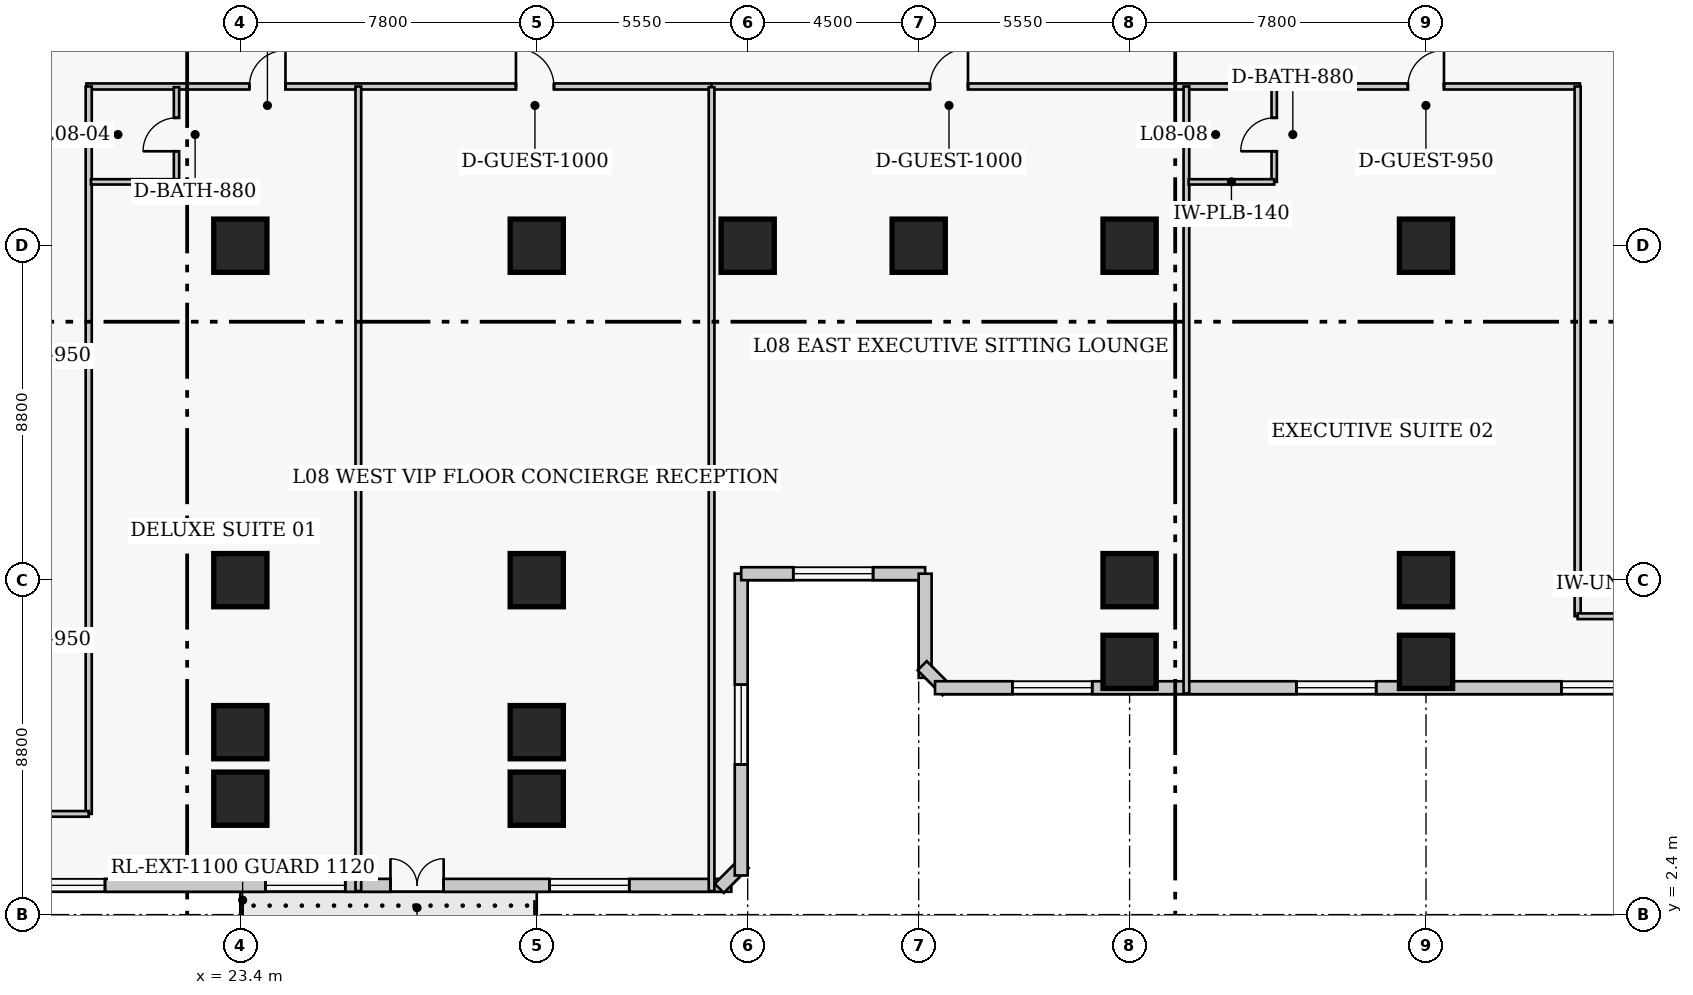
"""IFC4 building model, lengths in metres.
Left out: names, types, materials, properties, quantities, classifications, styles, units other than length and angle.
Written with IfcOpenShell. Run it as: python <this file> out.ifc"""

import sys

from ifc_helpers import new_model, si_unit, direction, frame, frame_2d, origin, origin_2d, place, context, subcontext, project, spatial, rectangle, extrude, element, fill, save


model = new_model("IFC4")
c1 = context("Model", 3, precision=1e-05, world=origin(), true_north=direction((0.0, 1.0)))
c2 = subcontext(c1, "Body", "Model", "MODEL_VIEW")
j1 = project(units=[si_unit("LENGTHUNIT", "METRE"), si_unit("PLANEANGLEUNIT", "RADIAN")], contexts=[c1])
p1 = place(None, origin())
s1 = spatial("IfcSite", under=j1, at=p1, CompositionType="ELEMENT")
p2 = place(p1, origin())
s2 = spatial("IfcBuilding", under=s1, at=p2, CompositionType="ELEMENT")
p3 = place(p2, frame((0.0, 0.0, 37.4)))
s3 = spatial("IfcBuildingStorey", under=s2, at=p3, CompositionType="ELEMENT", Elevation=37.4)
for number, where, z_axis, x_axis in (
    (1, (23.4, 11.2, 0.0), (0.0, 0.0, 1.0), (1.0, 0.0, 0.0)),
    (2, (23.4, 20.0, 0.0), (0.0, 0.0, 1.0), (1.0, 0.0, 0.0)),
    (3, (31.2, 11.2, 0.0), (0.0, 0.0, 1.0), (1.0, 0.0, 0.0)),
    (4, (31.2, 20.0, 0.0), (0.0, 0.0, 1.0), (1.0, 0.0, 0.0)),
    (5, (36.75, 20.0, 0.0), (0.0, 0.0, 1.0), (1.0, 0.0, 0.0)),
    (6, (41.25, 20.0, 0.0), (0.0, 0.0, 1.0), (1.0, 0.0, 0.0)),
    (7, (46.8, 11.2, 0.0), (0.0, 0.0, 1.0), (1.0, 0.0, 0.0)),
    (8, (46.8, 20.0, 0.0), (0.0, 0.0, 1.0), (1.0, 0.0, 0.0)),
    (9, (54.6, 11.2, 0.0), (0.0, 0.0, 1.0), (1.0, 0.0, 0.0)),
    (10, (54.6, 20.0, 0.0), (0.0, 0.0, 1.0), (1.0, 0.0, 0.0)),
    (11, (23.4, 7.2, 0.0), (0.0, 0.0, 1.0), (1.0, 0.0, 0.0)),
    (12, (31.2, 7.2, 0.0), (0.0, 0.0, 1.0), (1.0, 0.0, 0.0)),
    (13, (23.4, 5.45, 0.0), (0.0, 0.0, 1.0), (1.0, 0.0, 0.0)),
    (14, (31.2, 5.45, 0.0), (0.0, 0.0, 1.0), (1.0, 0.0, 0.0)),
    (15, (46.8, 9.05, 0.0), (0.0, 0.0, 1.0), (1.0, 0.0, 0.0)),
    (16, (54.6, 9.05, 0.0), (0.0, 0.0, 1.0), (1.0, 0.0, 0.0)),
):
    element("IfcColumn", number, at=place(p3, frame(where, z_axis=z_axis, x_axis=x_axis)), inside=s3, PredefinedType="COLUMN", context=c2, shape_type="SweptSolid", body=[
        extrude(rectangle(XDim=1.4, YDim=1.4, at=origin_2d()), origin(), (0.0, 0.0, 1.0), 3.8),
    ])
p4 = place(p3, frame((6.43, 3.17, 0.0), z_axis=(0.0, 0.0, 1.0), x_axis=(1.0, 0.0, 0.0)))
e17 = element("IfcWall", 17, at=p4, inside=s3, PredefinedType="SOLIDWALL", context=c2, shape_type="SweptSolid", body=[
    extrude(rectangle(XDim=29.89, YDim=0.34, at=frame_2d((14.945, 0.0))), origin(), (0.0, 0.0, 1.0), 3.54),
])
p5 = place(p4, frame((20.92, 0.0, 0.0)))
e18 = element("IfcOpeningElement", 18, at=p5, cuts=e17, PredefinedType="OPENING", context=c2, shape_type="SweptSolid", body=[
    extrude(rectangle(XDim=1.4, YDim=2.15, at=frame_2d((0.7, 1.075))), frame((0.0, 0.18, 0.0), z_axis=(0.0, -1.0, 0.0), x_axis=(1.0, 0.0, 0.0)), (0.0, 0.0, 1.0), 0.36),
])
p6 = place(p4, frame((2.686, 0.0, 0.85)))
e19 = element("IfcOpeningElement", 19, at=p6, cuts=e17, PredefinedType="OPENING", context=c2, shape_type="SweptSolid", body=[
    extrude(rectangle(XDim=2.1, YDim=1.85, at=frame_2d((1.05, 0.925))), frame((0.0, 0.18, 0.0), z_axis=(0.0, -1.0, 0.0), x_axis=(1.0, 0.0, 0.0)), (0.0, 0.0, 1.0), 0.36),
])
p7 = place(p4, frame((11.309, 0.0, 0.85)))
e20 = element("IfcOpeningElement", 20, at=p7, cuts=e17, PredefinedType="OPENING", context=c2, shape_type="SweptSolid", body=[
    extrude(rectangle(XDim=2.1, YDim=1.85, at=frame_2d((1.05, 0.925))), frame((0.0, 0.18, 0.0), z_axis=(0.0, -1.0, 0.0), x_axis=(1.0, 0.0, 0.0)), (0.0, 0.0, 1.0), 0.36),
])
p8 = place(p4, frame((17.631, 0.0, 0.85)))
e21 = element("IfcOpeningElement", 21, at=p8, cuts=e17, PredefinedType="OPENING", context=c2, shape_type="SweptSolid", body=[
    extrude(rectangle(XDim=2.1, YDim=1.85, at=frame_2d((1.05, 0.925))), frame((0.0, 0.18, 0.0), z_axis=(0.0, -1.0, 0.0), x_axis=(1.0, 0.0, 0.0)), (0.0, 0.0, 1.0), 0.36),
])
p9 = place(p4, frame((25.104, 0.0, 0.85)))
e22 = element("IfcOpeningElement", 22, at=p9, cuts=e17, PredefinedType="OPENING", context=c2, shape_type="SweptSolid", body=[
    extrude(rectangle(XDim=2.1, YDim=1.85, at=frame_2d((1.05, 0.925))), frame((0.0, 0.18, 0.0), z_axis=(0.0, -1.0, 0.0), x_axis=(1.0, 0.0, 0.0)), (0.0, 0.0, 1.0), 0.36),
])
p10 = place(p3, frame((36.001, 3.092, 0.0), z_axis=(0.0, 0.0, 1.0), x_axis=(0.707106781187, 0.707106781187, 0.0)))
e23 = element("IfcWall", 23, at=p10, inside=s3, PredefinedType="SOLIDWALL", context=c2, shape_type="SweptSolid", body=[
    extrude(rectangle(XDim=0.929, YDim=0.34, at=frame_2d((0.464, 0.0))), origin(), (0.0, 0.0, 1.0), 3.54),
])
p11 = place(p3, frame((36.58, 3.43, 0.0), z_axis=(0.0, 0.0, 1.0), x_axis=(0.0, 1.0, 0.0)))
e24 = element("IfcWall", 24, at=p11, inside=s3, PredefinedType="SOLIDWALL", context=c2, shape_type="SweptSolid", body=[
    extrude(rectangle(XDim=7.94, YDim=0.34, at=frame_2d((3.97, 0.0))), origin(), (0.0, 0.0, 1.0), 3.54),
])
p12 = place(p11, frame((2.92, 0.0, 0.85)))
e25 = element("IfcOpeningElement", 25, at=p12, cuts=e24, PredefinedType="OPENING", context=c2, shape_type="SweptSolid", body=[
    extrude(rectangle(XDim=2.1, YDim=1.85, at=frame_2d((1.05, 0.925))), frame((0.0, 0.18, 0.0), z_axis=(0.0, -1.0, 0.0), x_axis=(1.0, 0.0, 0.0)), (0.0, 0.0, 1.0), 0.36),
])
p13 = place(p3, frame((36.58, 11.37, 0.0), z_axis=(0.0, 0.0, 1.0), x_axis=(1.0, 0.0, 0.0)))
e26 = element("IfcWall", 26, at=p13, inside=s3, PredefinedType="SOLIDWALL", context=c2, shape_type="SweptSolid", body=[
    extrude(rectangle(XDim=4.84, YDim=0.34, at=frame_2d((2.42, 0.0))), origin(), (0.0, 0.0, 1.0), 3.54),
])
p14 = place(p13, frame((1.37, 0.0, 0.85)))
e27 = element("IfcOpeningElement", 27, at=p14, cuts=e26, PredefinedType="OPENING", context=c2, shape_type="SweptSolid", body=[
    extrude(rectangle(XDim=2.1, YDim=1.85, at=frame_2d((1.05, 0.925))), frame((0.0, 0.18, 0.0), z_axis=(0.0, -1.0, 0.0), x_axis=(1.0, 0.0, 0.0)), (0.0, 0.0, 1.0), 0.36),
])
p15 = place(p3, frame((41.42, 11.37, 0.0), z_axis=(0.0, 0.0, 1.0), x_axis=(0.0, -1.0, 0.0)))
e28 = element("IfcWall", 28, at=p15, inside=s3, PredefinedType="SOLIDWALL", context=c2, shape_type="SweptSolid", body=[
    extrude(rectangle(XDim=2.74, YDim=0.34, at=frame_2d((1.37, 0.0))), origin(), (0.0, 0.0, 1.0), 3.54),
])
p16 = place(p3, frame((41.342, 8.948, 0.0), z_axis=(0.0, 0.0, 1.0), x_axis=(0.707238225886, -0.706975312048, 0.0)))
e29 = element("IfcWall", 29, at=p16, inside=s3, PredefinedType="SOLIDWALL", context=c2, shape_type="SweptSolid", body=[
    extrude(rectangle(XDim=0.929, YDim=0.34, at=frame_2d((0.464, 0.0))), origin(), (0.0, 0.0, 1.0), 3.54),
])
p17 = place(p3, frame((41.68, 8.37, 0.0), z_axis=(0.0, 0.0, 1.0), x_axis=(1.0, 0.0, 0.0)))
e30 = element("IfcWall", 30, at=p17, inside=s3, PredefinedType="SOLIDWALL", context=c2, shape_type="SweptSolid", body=[
    extrude(rectangle(XDim=29.89, YDim=0.34, at=frame_2d((14.945, 0.0))), origin(), (0.0, 0.0, 1.0), 3.54),
])
p18 = place(p17, frame((2.036, 0.0, 0.85)))
e31 = element("IfcOpeningElement", 31, at=p18, cuts=e30, PredefinedType="OPENING", context=c2, shape_type="SweptSolid", body=[
    extrude(rectangle(XDim=2.1, YDim=1.85, at=frame_2d((1.05, 0.925))), frame((0.0, 0.18, 0.0), z_axis=(0.0, -1.0, 0.0), x_axis=(1.0, 0.0, 0.0)), (0.0, 0.0, 1.0), 0.36),
])
p19 = place(p17, frame((9.509, 0.0, 0.85)))
e32 = element("IfcOpeningElement", 32, at=p19, cuts=e30, PredefinedType="OPENING", context=c2, shape_type="SweptSolid", body=[
    extrude(rectangle(XDim=2.1, YDim=1.85, at=frame_2d((1.05, 0.925))), frame((0.0, 0.18, 0.0), z_axis=(0.0, -1.0, 0.0), x_axis=(1.0, 0.0, 0.0)), (0.0, 0.0, 1.0), 0.36),
])
p20 = place(p17, frame((16.481, 0.0, 0.85)))
e33 = element("IfcOpeningElement", 33, at=p20, cuts=e30, PredefinedType="OPENING", context=c2, shape_type="SweptSolid", body=[
    extrude(rectangle(XDim=2.1, YDim=1.85, at=frame_2d((1.05, 0.925))), frame((0.0, 0.18, 0.0), z_axis=(0.0, -1.0, 0.0), x_axis=(1.0, 0.0, 0.0)), (0.0, 0.0, 1.0), 0.36),
])
p21 = place(p17, frame((26.254, 0.0, 0.85)))
e34 = element("IfcOpeningElement", 34, at=p21, cuts=e30, PredefinedType="OPENING", context=c2, shape_type="SweptSolid", body=[
    extrude(rectangle(XDim=2.1, YDim=1.85, at=frame_2d((1.05, 0.925))), frame((0.0, 0.18, 0.0), z_axis=(0.0, -1.0, 0.0), x_axis=(1.0, 0.0, 0.0)), (0.0, 0.0, 1.0), 0.36),
])
p22 = place(p3, frame((19.35, 24.19, 0.0), z_axis=(0.0, 0.0, 1.0), x_axis=(1.0, 0.0, 0.0)))
e35 = element("IfcWall", 35, at=p22, inside=s3, PredefinedType="PARTITIONING", context=c2, shape_type="SweptSolid", body=[
    extrude(rectangle(XDim=16.45, YDim=0.16, at=frame_2d((8.225, 0.0))), origin(), (0.0, 0.0, 1.0), 3.54),
])
p23 = place(p22, frame((4.288, 0.0, 0.0)))
e36 = element("IfcOpeningElement", 36, at=p23, cuts=e35, PredefinedType="OPENING", context=c2, shape_type="SweptSolid", body=[
    extrude(rectangle(XDim=0.95, YDim=2.1, at=frame_2d((0.475, 1.05))), frame((0.0, 0.09, 0.0), z_axis=(0.0, -1.0, 0.0), x_axis=(1.0, 0.0, 0.0)), (0.0, 0.0, 1.0), 0.18),
])
p24 = place(p22, frame((11.302, 0.0, 0.0)))
e37 = element("IfcOpeningElement", 37, at=p24, cuts=e35, PredefinedType="OPENING", context=c2, shape_type="SweptSolid", body=[
    extrude(rectangle(XDim=1.0, YDim=2.15, at=frame_2d((0.5, 1.075))), frame((0.0, 0.09, 0.0), z_axis=(0.0, -1.0, 0.0), x_axis=(1.0, 0.0, 0.0)), (0.0, 0.0, 1.0), 0.18),
])
p25 = place(p3, frame((35.8, 24.19, 0.0), z_axis=(0.0, 0.0, 1.0), x_axis=(1.0, 0.0, 0.0)))
e38 = element("IfcWall", 38, at=p25, inside=s3, PredefinedType="PARTITIONING", context=c2, shape_type="SweptSolid", body=[
    extrude(rectangle(XDim=22.85, YDim=0.16, at=frame_2d((11.425, 0.0))), origin(), (0.0, 0.0, 1.0), 3.54),
])
p26 = place(p25, frame((5.748, 0.0, 0.0)))
e39 = element("IfcOpeningElement", 39, at=p26, cuts=e38, PredefinedType="OPENING", context=c2, shape_type="SweptSolid", body=[
    extrude(rectangle(XDim=1.0, YDim=2.15, at=frame_2d((0.5, 1.075))), frame((0.0, 0.09, 0.0), z_axis=(0.0, -1.0, 0.0), x_axis=(1.0, 0.0, 0.0)), (0.0, 0.0, 1.0), 0.18),
])
p27 = place(p25, frame((18.323, 0.0, 0.0)))
e40 = element("IfcOpeningElement", 40, at=p27, cuts=e38, PredefinedType="OPENING", context=c2, shape_type="SweptSolid", body=[
    extrude(rectangle(XDim=0.95, YDim=2.1, at=frame_2d((0.475, 1.05))), frame((0.0, 0.09, 0.0), z_axis=(0.0, -1.0, 0.0), x_axis=(1.0, 0.0, 0.0)), (0.0, 0.0, 1.0), 0.18),
])
p28 = place(p3, frame((19.41, 5.05, 0.0), z_axis=(0.0, 0.0, 1.0), x_axis=(0.0, 1.0, 0.0)))
e41 = element("IfcWall", 41, at=p28, inside=s3, PredefinedType="PARTITIONING", context=c2, shape_type="SweptSolid", body=[
    extrude(rectangle(XDim=19.14, YDim=0.16, at=frame_2d((9.57, 0.0))), origin(), (0.0, 0.0, 1.0), 3.004),
])
p29 = place(p3, frame((58.59, 10.25, 0.0), z_axis=(0.0, 0.0, 1.0), x_axis=(0.0, 1.0, 0.0)))
e42 = element("IfcWall", 42, at=p29, inside=s3, PredefinedType="PARTITIONING", context=c2, shape_type="SweptSolid", body=[
    extrude(rectangle(XDim=13.94, YDim=0.16, at=frame_2d((6.97, 0.0))), origin(), (0.0, 0.0, 1.0), 3.004),
])
for number, where, z_axis, x_axis in (
    (43, (58.59, 10.25, 0.0), (0.0, 0.0, 1.0), (1.0, 0.0, 0.0)),
    (44, (17.19, 5.05, 0.0), (0.0, 0.0, 1.0), (1.0, 0.0, 0.0)),
):
    element("IfcWall", number, at=place(p3, frame(where, z_axis=z_axis, x_axis=x_axis)), inside=s3, PredefinedType="PARTITIONING", context=c2, shape_type="SweptSolid", body=[
        extrude(rectangle(XDim=2.22, YDim=0.15, at=frame_2d((1.11, 0.0))), origin(), (0.0, 0.0, 1.0), 3.54),
    ])
p30 = place(p3, frame((21.72, 21.68, 0.0), z_axis=(0.0, 0.0, 1.0), x_axis=(0.0, 1.0, 0.0)))
e45 = element("IfcWall", 45, at=p30, inside=s3, PredefinedType="PLUMBINGWALL", context=c2, shape_type="SweptSolid", body=[
    extrude(rectangle(XDim=2.49, YDim=0.14, at=frame_2d((1.245, 0.0))), origin(), (0.0, 0.0, 1.0), 3.54),
])
p31 = place(p30, frame((0.805, 0.0, 0.0)))
e46 = element("IfcOpeningElement", 46, at=p31, cuts=e45, PredefinedType="OPENING", context=c2, shape_type="SweptSolid", body=[
    extrude(rectangle(XDim=0.88, YDim=2.05, at=frame_2d((0.44, 1.025))), frame((0.0, 0.08, 0.0), z_axis=(0.0, -1.0, 0.0), x_axis=(1.0, 0.0, 0.0)), (0.0, 0.0, 1.0), 0.16),
])
p32 = place(p3, frame((19.47, 21.68, 0.0), z_axis=(0.0, 0.0, 1.0), x_axis=(1.0, 0.0, 0.0)))
e47 = element("IfcWall", 47, at=p32, inside=s3, PredefinedType="PLUMBINGWALL", context=c2, shape_type="SweptSolid", body=[
    extrude(rectangle(XDim=2.25, YDim=0.14, at=frame_2d((1.125, 0.0))), origin(), (0.0, 0.0, 1.0), 3.54),
])
p33 = place(p3, frame((26.505, 3.02, 0.0), z_axis=(0.0, 0.0, 1.0), x_axis=(0.0, 1.0, 0.0)))
e48 = element("IfcWall", 48, at=p33, inside=s3, PredefinedType="PARTITIONING", context=c2, shape_type="SweptSolid", body=[
    extrude(rectangle(XDim=21.17, YDim=0.15, at=frame_2d((10.585, 0.0))), origin(), (0.0, 0.0, 1.0), 3.54),
])
p34 = place(p3, frame((35.8, 3.02, 0.0), z_axis=(0.0, 0.0, 1.0), x_axis=(0.0, 1.0, 0.0)))
e49 = element("IfcWall", 49, at=p34, inside=s3, PredefinedType="PARTITIONING", context=c2, shape_type="SweptSolid", body=[
    extrude(rectangle(XDim=21.15, YDim=0.15, at=frame_2d((10.575, 0.0))), origin(), (0.0, 0.0, 1.0), 3.54),
])
p35 = place(p3, frame((48.295, 8.22, 0.0), z_axis=(0.0, 0.0, 1.0), x_axis=(0.0, 1.0, 0.0)))
e50 = element("IfcWall", 50, at=p35, inside=s3, PredefinedType="PARTITIONING", context=c2, shape_type="SweptSolid", body=[
    extrude(rectangle(XDim=15.97, YDim=0.15, at=frame_2d((7.985, 0.0))), origin(), (0.0, 0.0, 1.0), 3.54),
])
p36 = place(p3, frame((50.605, 21.68, 0.0), z_axis=(0.0, 0.0, 1.0), x_axis=(0.0, 1.0, 0.0)))
e51 = element("IfcWall", 51, at=p36, inside=s3, PredefinedType="PLUMBINGWALL", context=c2, shape_type="SweptSolid", body=[
    extrude(rectangle(XDim=2.49, YDim=0.14, at=frame_2d((1.245, 0.0))), origin(), (0.0, 0.0, 1.0), 3.54),
])
p37 = place(p36, frame((0.805, 0.0, 0.0)))
e52 = element("IfcOpeningElement", 52, at=p37, cuts=e51, PredefinedType="OPENING", context=c2, shape_type="SweptSolid", body=[
    extrude(rectangle(XDim=0.88, YDim=2.05, at=frame_2d((0.44, 1.025))), frame((0.0, 0.08, 0.0), z_axis=(0.0, -1.0, 0.0), x_axis=(1.0, 0.0, 0.0)), (0.0, 0.0, 1.0), 0.16),
])
p38 = place(p3, frame((48.355, 21.68, 0.0), z_axis=(0.0, 0.0, 1.0), x_axis=(1.0, 0.0, 0.0)))
e53 = element("IfcWall", 53, at=p38, inside=s3, PredefinedType="PLUMBINGWALL", context=c2, shape_type="SweptSolid", body=[
    extrude(rectangle(XDim=2.25, YDim=0.14, at=frame_2d((1.125, 0.0))), origin(), (0.0, 0.0, 1.0), 3.54),
])
p39 = place(p5, origin())
e54 = element("IfcDoor", 54, at=p39, inside=s3, OperationType="DOUBLE_DOOR_SINGLE_SWING", PredefinedType="DOOR", context=c2, shape_type="SweptSolid", body=[
    extrude(rectangle(XDim=1.4, YDim=2.15, at=frame_2d((0.7, 1.075))), frame((0.0, 0.025, 0.0), z_axis=(0.0, -1.0, 0.0), x_axis=(1.0, 0.0, 0.0)), (0.0, 0.0, 1.0), 0.05),
])
fill(e18, e54)
p40 = place(p7, origin())
e55 = element("IfcWindow", 55, at=p40, inside=s3, PartitioningType="SINGLE_PANEL", PredefinedType="WINDOW", context=c2, shape_type="SweptSolid", body=[
    extrude(rectangle(XDim=2.1, YDim=1.85, at=frame_2d((1.05, 0.925))), frame((0.0, 0.03, 0.0), z_axis=(0.0, -1.0, 0.0), x_axis=(1.0, 0.0, 0.0)), (0.0, 0.0, 1.0), 0.06),
])
fill(e20, e55)
p41 = place(p8, origin())
e56 = element("IfcWindow", 56, at=p41, inside=s3, PartitioningType="SINGLE_PANEL", PredefinedType="WINDOW", context=c2, shape_type="SweptSolid", body=[
    extrude(rectangle(XDim=2.1, YDim=1.85, at=frame_2d((1.05, 0.925))), frame((0.0, 0.03, 0.0), z_axis=(0.0, -1.0, 0.0), x_axis=(1.0, 0.0, 0.0)), (0.0, 0.0, 1.0), 0.06),
])
fill(e21, e56)
p42 = place(p9, origin())
e57 = element("IfcWindow", 57, at=p42, inside=s3, PartitioningType="SINGLE_PANEL", PredefinedType="WINDOW", context=c2, shape_type="SweptSolid", body=[
    extrude(rectangle(XDim=2.1, YDim=1.85, at=frame_2d((1.05, 0.925))), frame((0.0, 0.03, 0.0), z_axis=(0.0, -1.0, 0.0), x_axis=(1.0, 0.0, 0.0)), (0.0, 0.0, 1.0), 0.06),
])
fill(e22, e57)
p43 = place(p12, origin())
e58 = element("IfcWindow", 58, at=p43, inside=s3, PartitioningType="SINGLE_PANEL", PredefinedType="WINDOW", context=c2, shape_type="SweptSolid", body=[
    extrude(rectangle(XDim=2.1, YDim=1.85, at=frame_2d((1.05, 0.925))), frame((0.0, 0.03, 0.0), z_axis=(0.0, -1.0, 0.0), x_axis=(1.0, 0.0, 0.0)), (0.0, 0.0, 1.0), 0.06),
])
fill(e25, e58)
p44 = place(p14, origin())
e59 = element("IfcWindow", 59, at=p44, inside=s3, PartitioningType="SINGLE_PANEL", PredefinedType="WINDOW", context=c2, shape_type="SweptSolid", body=[
    extrude(rectangle(XDim=2.1, YDim=1.85, at=frame_2d((1.05, 0.925))), frame((0.0, 0.03, 0.0), z_axis=(0.0, -1.0, 0.0), x_axis=(1.0, 0.0, 0.0)), (0.0, 0.0, 1.0), 0.06),
])
fill(e27, e59)
p45 = place(p18, origin())
e60 = element("IfcWindow", 60, at=p45, inside=s3, PartitioningType="SINGLE_PANEL", PredefinedType="WINDOW", context=c2, shape_type="SweptSolid", body=[
    extrude(rectangle(XDim=2.1, YDim=1.85, at=frame_2d((1.05, 0.925))), frame((0.0, 0.03, 0.0), z_axis=(0.0, -1.0, 0.0), x_axis=(1.0, 0.0, 0.0)), (0.0, 0.0, 1.0), 0.06),
])
fill(e31, e60)
p46 = place(p19, origin())
e61 = element("IfcWindow", 61, at=p46, inside=s3, PartitioningType="SINGLE_PANEL", PredefinedType="WINDOW", context=c2, shape_type="SweptSolid", body=[
    extrude(rectangle(XDim=2.1, YDim=1.85, at=frame_2d((1.05, 0.925))), frame((0.0, 0.03, 0.0), z_axis=(0.0, -1.0, 0.0), x_axis=(1.0, 0.0, 0.0)), (0.0, 0.0, 1.0), 0.06),
])
fill(e32, e61)
p47 = place(p20, origin())
e62 = element("IfcWindow", 62, at=p47, inside=s3, PartitioningType="SINGLE_PANEL", PredefinedType="WINDOW", context=c2, shape_type="SweptSolid", body=[
    extrude(rectangle(XDim=2.1, YDim=1.85, at=frame_2d((1.05, 0.925))), frame((0.0, 0.03, 0.0), z_axis=(0.0, -1.0, 0.0), x_axis=(1.0, 0.0, 0.0)), (0.0, 0.0, 1.0), 0.06),
])
fill(e33, e62)
p48 = place(p31, origin())
e63 = element("IfcDoor", 63, at=p48, inside=s3, OperationType="SINGLE_SWING_LEFT", PredefinedType="DOOR", context=c2, shape_type="SweptSolid", body=[
    extrude(rectangle(XDim=0.88, YDim=2.05, at=frame_2d((0.44, 1.025))), frame((0.0, 0.025, 0.0), z_axis=(0.0, -1.0, 0.0), x_axis=(1.0, 0.0, 0.0)), (0.0, 0.0, 1.0), 0.05),
])
fill(e46, e63)
p49 = place(p23, origin())
e64 = element("IfcDoor", 64, at=p49, inside=s3, OperationType="SINGLE_SWING_RIGHT", PredefinedType="DOOR", context=c2, shape_type="SweptSolid", body=[
    extrude(rectangle(XDim=0.95, YDim=2.1, at=frame_2d((0.475, 1.05))), frame((0.0, 0.025, 0.0), z_axis=(0.0, -1.0, 0.0), x_axis=(1.0, 0.0, 0.0)), (0.0, 0.0, 1.0), 0.05),
])
fill(e36, e64)
p50 = place(p24, origin())
e65 = element("IfcDoor", 65, at=p50, inside=s3, OperationType="SINGLE_SWING_LEFT", PredefinedType="DOOR", context=c2, shape_type="SweptSolid", body=[
    extrude(rectangle(XDim=1.0, YDim=2.15, at=frame_2d((0.5, 1.075))), frame((0.0, 0.025, 0.0), z_axis=(0.0, -1.0, 0.0), x_axis=(1.0, 0.0, 0.0)), (0.0, 0.0, 1.0), 0.05),
])
fill(e37, e65)
p51 = place(p26, origin())
e66 = element("IfcDoor", 66, at=p51, inside=s3, OperationType="SINGLE_SWING_RIGHT", PredefinedType="DOOR", context=c2, shape_type="SweptSolid", body=[
    extrude(rectangle(XDim=1.0, YDim=2.15, at=frame_2d((0.5, 1.075))), frame((0.0, 0.025, 0.0), z_axis=(0.0, -1.0, 0.0), x_axis=(1.0, 0.0, 0.0)), (0.0, 0.0, 1.0), 0.05),
])
fill(e39, e66)
p52 = place(p37, origin())
e67 = element("IfcDoor", 67, at=p52, inside=s3, OperationType="SINGLE_SWING_LEFT", PredefinedType="DOOR", context=c2, shape_type="SweptSolid", body=[
    extrude(rectangle(XDim=0.88, YDim=2.05, at=frame_2d((0.44, 1.025))), frame((0.0, 0.025, 0.0), z_axis=(0.0, -1.0, 0.0), x_axis=(1.0, 0.0, 0.0)), (0.0, 0.0, 1.0), 0.05),
])
fill(e52, e67)
p53 = place(p27, origin())
e68 = element("IfcDoor", 68, at=p53, inside=s3, OperationType="SINGLE_SWING_RIGHT", PredefinedType="DOOR", context=c2, shape_type="SweptSolid", body=[
    extrude(rectangle(XDim=0.95, YDim=2.1, at=frame_2d((0.475, 1.05))), frame((0.0, 0.025, 0.0), z_axis=(0.0, -1.0, 0.0), x_axis=(1.0, 0.0, 0.0)), (0.0, 0.0, 1.0), 0.05),
])
fill(e40, e68)
save(model, sys.argv[1])
